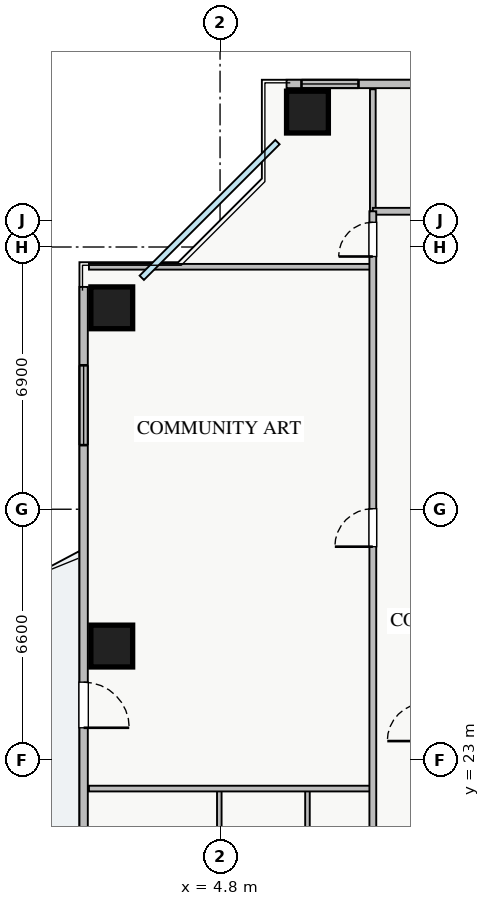
"""IFC4 building model, lengths in metres.
Left out: names, types, materials, properties, quantities, classifications, styles, units other than length and angle.
Written with IfcOpenShell. Run it as: python <this file> out.ifc"""

import sys

from ifc_helpers import new_model, si_unit, direction, frame, frame_2d, origin, origin_2d, place, context, subcontext, project, spatial, rectangle, extrude, source, transform, mapped, element, fill, save


model = new_model("IFC4")
c1 = context("Model", 3, precision=1e-05, world=origin(), true_north=direction((0.0, 1.0)))
c2 = subcontext(c1, "Body", "Model", "MODEL_VIEW")
j1 = project(units=[si_unit("LENGTHUNIT", "METRE"), si_unit("PLANEANGLEUNIT", "RADIAN")], contexts=[c1])
p1 = place(None, origin())
s1 = spatial("IfcSite", under=j1, at=p1, CompositionType="ELEMENT")
p2 = place(p1, origin())
s2 = spatial("IfcBuilding", under=s1, at=p2, CompositionType="ELEMENT")
p3 = place(p2, frame((0.0, 0.0, 103.5)))
s3 = spatial("IfcBuildingStorey", under=s2, at=p3, CompositionType="ELEMENT", Elevation=103.5)
m1 = source(origin(), c2, "Body", "SweptSolid", [
    extrude(rectangle(XDim=1.1, YDim=1.1, at=origin_2d()), origin(), (0.0, 0.0, 1.0), 3.25),
])
for number, where, z_axis, x_axis in (
    (1, (7.1, 40.05, 0.0), (0.0, 0.0, 1.0), (1.0, 0.0, 0.0)),
    (2, (1.95, 34.9, 0.0), (0.0, 0.0, 1.0), (1.0, 0.0, 0.0)),
    (3, (1.95, 26.0, 0.0), (0.0, 0.0, 1.0), (1.0, 0.0, 0.0)),
):
    element("IfcColumn", number, at=place(p3, frame(where, z_axis=z_axis, x_axis=x_axis)), inside=s3, PredefinedType="COLUMN", context=c2, shape_type="MappedRepresentation", body=[
        mapped(m1, transform((0.0, 0.0, 0.0), x_axis=(1.0, 0.0, 0.0), y_axis=(0.0, 1.0, 0.0), z_axis=(0.0, 0.0, 1.0), scale=1.0)),
    ])
p4 = place(p3, frame((6.55, 40.79, 0.0), z_axis=(0.0, 0.0, 1.0), x_axis=(1.0, 0.0, 0.0)))
e4 = element("IfcWall", 4, at=p4, inside=s3, PredefinedType="STANDARD", context=c2, shape_type="SweptSolid", body=[
    extrude(rectangle(XDim=24.9, YDim=0.22, at=frame_2d((12.45, 0.0))), origin(), (0.0, 0.0, 1.0), 2.61),
])
p5 = place(p4, frame((13.3, 0.0, 0.0)))
e5 = element("IfcOpeningElement", 5, at=p5, cuts=e4, PredefinedType="OPENING", context=c2, shape_type="SweptSolid", body=[
    extrude(rectangle(XDim=1.2, YDim=2.1, at=frame_2d((0.6, 1.05))), frame((0.0, 0.12, 0.0), z_axis=(0.0, -1.0, 0.0), x_axis=(1.0, 0.0, 0.0)), (0.0, 0.0, 1.0), 0.24),
])
p6 = place(p4, frame((0.393, 0.0, 0.9)))
e6 = element("IfcOpeningElement", 6, at=p6, cuts=e4, PredefinedType="OPENING", context=c2, shape_type="SweptSolid", body=[
    extrude(rectangle(XDim=1.5, YDim=1.5, at=frame_2d((0.75, 0.75))), frame((0.0, 0.12, 0.0), z_axis=(0.0, -1.0, 0.0), x_axis=(1.0, 0.0, 0.0)), (0.0, 0.0, 1.0), 0.24),
])
p7 = place(p4, frame((9.76, 0.0, 0.9)))
e7 = element("IfcOpeningElement", 7, at=p7, cuts=e4, PredefinedType="OPENING", context=c2, shape_type="SweptSolid", body=[
    extrude(rectangle(XDim=1.8, YDim=1.5, at=frame_2d((0.9, 0.75))), frame((0.0, 0.12, 0.0), z_axis=(0.0, -1.0, 0.0), x_axis=(1.0, 0.0, 0.0)), (0.0, 0.0, 1.0), 0.24),
])
p8 = place(p4, frame((14.813, 0.0, 0.9)))
e8 = element("IfcOpeningElement", 8, at=p8, cuts=e4, PredefinedType="OPENING", context=c2, shape_type="SweptSolid", body=[
    extrude(rectangle(XDim=1.5, YDim=1.45, at=frame_2d((0.75, 0.725))), frame((0.0, 0.12, 0.0), z_axis=(0.0, -1.0, 0.0), x_axis=(1.0, 0.0, 0.0)), (0.0, 0.0, 1.0), 0.24),
])
p9 = place(p4, frame((20.738, 0.0, 0.9)))
e9 = element("IfcOpeningElement", 9, at=p9, cuts=e4, PredefinedType="OPENING", context=c2, shape_type="SweptSolid", body=[
    extrude(rectangle(XDim=2.1, YDim=1.48, at=frame_2d((1.05, 0.74))), frame((0.0, 0.12, 0.0), z_axis=(0.0, -1.0, 0.0), x_axis=(1.0, 0.0, 0.0)), (0.0, 0.0, 1.0), 0.24),
])
p10 = place(p4, frame((4.171, 0.0, 0.9)))
e10 = element("IfcOpeningElement", 10, at=p10, cuts=e4, PredefinedType="OPENING", context=c2, shape_type="SweptSolid", body=[
    extrude(rectangle(XDim=2.4, YDim=1.5, at=frame_2d((1.2, 0.75))), frame((0.0, 0.12, 0.0), z_axis=(0.0, -1.0, 0.0), x_axis=(1.0, 0.0, 0.0)), (0.0, 0.0, 1.0), 0.24),
])
p11 = place(p3, frame((1.21, 10.55, 0.0), z_axis=(0.0, 0.0, 1.0), x_axis=(0.0, 1.0, 0.0)))
e11 = element("IfcWall", 11, at=p11, inside=s3, PredefinedType="STANDARD", context=c2, shape_type="SweptSolid", body=[
    extrude(rectangle(XDim=24.9, YDim=0.22, at=frame_2d((12.45, 0.0))), origin(), (0.0, 0.0, 1.0), 2.61),
])
p12 = place(p11, frame((13.3, 0.0, 0.0)))
e12 = element("IfcOpeningElement", 12, at=p12, cuts=e11, PredefinedType="OPENING", context=c2, shape_type="SweptSolid", body=[
    extrude(rectangle(XDim=1.2, YDim=2.1, at=frame_2d((0.6, 1.05))), frame((0.0, 0.12, 0.0), z_axis=(0.0, -1.0, 0.0), x_axis=(1.0, 0.0, 0.0)), (0.0, 0.0, 1.0), 0.24),
])
p13 = place(p11, frame((1.912, 0.0, 0.9)))
e13 = element("IfcOpeningElement", 13, at=p13, cuts=e11, PredefinedType="OPENING", context=c2, shape_type="SweptSolid", body=[
    extrude(rectangle(XDim=2.4, YDim=1.48, at=frame_2d((1.2, 0.74))), frame((0.0, 0.12, 0.0), z_axis=(0.0, -1.0, 0.0), x_axis=(1.0, 0.0, 0.0)), (0.0, 0.0, 1.0), 0.24),
])
p14 = place(p11, frame((20.737, 0.0, 0.9)))
e14 = element("IfcOpeningElement", 14, at=p14, cuts=e11, PredefinedType="OPENING", context=c2, shape_type="SweptSolid", body=[
    extrude(rectangle(XDim=2.1, YDim=1.48, at=frame_2d((1.05, 0.74))), frame((0.0, 0.12, 0.0), z_axis=(0.0, -1.0, 0.0), x_axis=(1.0, 0.0, 0.0)), (0.0, 0.0, 1.0), 0.24),
])
p15 = place(p11, frame((5.38, 0.0, 0.9)))
e15 = element("IfcOpeningElement", 15, at=p15, cuts=e11, PredefinedType="OPENING", context=c2, shape_type="SweptSolid", body=[
    extrude(rectangle(XDim=0.9, YDim=1.2, at=frame_2d((0.45, 0.6))), frame((0.0, 0.12, 0.0), z_axis=(0.0, -1.0, 0.0), x_axis=(1.0, 0.0, 0.0)), (0.0, 0.0, 1.0), 0.24),
])
p16 = place(p3, frame((8.82, 37.44, 0.0), z_axis=(0.0, 0.0, 1.0), x_axis=(0.0, 1.0, 0.0)))
e16 = element("IfcWall", 16, at=p16, inside=s3, PredefinedType="PARTITIONING", context=c2, shape_type="SweptSolid", body=[
    extrude(rectangle(XDim=3.21, YDim=0.15, at=frame_2d((1.605, 0.0))), origin(), (0.0, 0.0, 1.0), 3.07),
])
p17 = place(p3, frame((8.82, 37.44, 0.0), z_axis=(0.0, 0.0, 1.0), x_axis=(1.0, 0.0, 0.0)))
e17 = element("IfcWall", 17, at=p17, inside=s3, PredefinedType="PARTITIONING", context=c2, shape_type="SweptSolid", body=[
    extrude(rectangle(XDim=23.58, YDim=0.18, at=frame_2d((11.79, 0.0))), origin(), (0.0, 0.0, 1.0), 3.07),
])
p18 = place(p17, frame((2.75, 0.0, 0.0)))
e18 = element("IfcOpeningElement", 18, at=p18, cuts=e17, PredefinedType="OPENING", context=c2, shape_type="SweptSolid", body=[
    extrude(rectangle(XDim=1.0, YDim=2.05, at=frame_2d((0.5, 1.025))), frame((0.0, 0.1, 0.0), z_axis=(0.0, -1.0, 0.0), x_axis=(1.0, 0.0, 0.0)), (0.0, 0.0, 1.0), 0.2),
])
p19 = place(p17, frame((7.89, 0.0, 0.0)))
e19 = element("IfcOpeningElement", 19, at=p19, cuts=e17, PredefinedType="OPENING", context=c2, shape_type="SweptSolid", body=[
    extrude(rectangle(XDim=1.0, YDim=2.05, at=frame_2d((0.5, 1.025))), frame((0.0, 0.1, 0.0), z_axis=(0.0, -1.0, 0.0), x_axis=(1.0, 0.0, 0.0)), (0.0, 0.0, 1.0), 0.2),
])
p20 = place(p17, frame((13.325, 0.0, 0.0)))
e20 = element("IfcOpeningElement", 20, at=p20, cuts=e17, PredefinedType="OPENING", context=c2, shape_type="SweptSolid", body=[
    extrude(rectangle(XDim=1.0, YDim=2.05, at=frame_2d((0.5, 1.025))), frame((0.0, 0.1, 0.0), z_axis=(0.0, -1.0, 0.0), x_axis=(1.0, 0.0, 0.0)), (0.0, 0.0, 1.0), 0.2),
])
p21 = place(p17, frame((19.765, 0.0, 0.0)))
e21 = element("IfcOpeningElement", 21, at=p21, cuts=e17, PredefinedType="OPENING", context=c2, shape_type="SweptSolid", body=[
    extrude(rectangle(XDim=1.0, YDim=2.05, at=frame_2d((0.5, 1.025))), frame((0.0, 0.1, 0.0), z_axis=(0.0, -1.0, 0.0), x_axis=(1.0, 0.0, 0.0)), (0.0, 0.0, 1.0), 0.2),
])
p22 = place(p3, frame((1.35, 35.98, 0.0), z_axis=(0.0, 0.0, 1.0), x_axis=(1.0, 0.0, 0.0)))
e22 = element("IfcWall", 22, at=p22, inside=s3, PredefinedType="PARTITIONING", context=c2, shape_type="SweptSolid", body=[
    extrude(rectangle(XDim=7.47, YDim=0.15, at=frame_2d((3.735, 0.0))), origin(), (0.0, 0.0, 1.0), 3.07),
])
for number, where, z_axis, x_axis in (
    (23, (4.78, 15.71, 0.0), (0.0, 0.0, 1.0), (0.0, 1.0, 0.0)),
    (24, (7.1, 15.71, 0.0), (0.0, 0.0, 1.0), (0.0, 1.0, 0.0)),
):
    element("IfcWall", number, at=place(p3, frame(where, z_axis=z_axis, x_axis=x_axis)), inside=s3, PredefinedType="PLUMBINGWALL", context=c2, shape_type="SweptSolid", body=[
        extrude(rectangle(XDim=6.54, YDim=0.12, at=frame_2d((3.27, 0.0))), origin(), (0.0, 0.0, 1.0), 3.07),
    ])
p23 = place(p3, frame((1.35, 22.25, 0.0), z_axis=(0.0, 0.0, 1.0), x_axis=(1.0, 0.0, 0.0)))
e25 = element("IfcWall", 25, at=p23, inside=s3, PredefinedType="PARTITIONING", context=c2, shape_type="SweptSolid", body=[
    extrude(rectangle(XDim=7.47, YDim=0.15, at=frame_2d((3.735, 0.0))), origin(), (0.0, 0.0, 1.0), 3.07),
])
p24 = place(p3, frame((8.82, 8.31, 0.0), z_axis=(0.0, 0.0, 1.0), x_axis=(0.0, 1.0, 0.0)))
e26 = element("IfcWall", 26, at=p24, inside=s3, PredefinedType="PARTITIONING", context=c2, shape_type="SweptSolid", body=[
    extrude(rectangle(XDim=29.13, YDim=0.18, at=frame_2d((14.565, 0.0))), origin(), (0.0, 0.0, 1.0), 3.07),
])
p25 = place(p24, frame((27.94, 0.0, 0.0)))
e27 = element("IfcOpeningElement", 27, at=p25, cuts=e26, PredefinedType="OPENING", context=c2, shape_type="SweptSolid", body=[
    extrude(rectangle(XDim=0.9, YDim=2.05, at=frame_2d((0.45, 1.025))), frame((0.0, 0.1, 0.0), z_axis=(0.0, -1.0, 0.0), x_axis=(1.0, 0.0, 0.0)), (0.0, 0.0, 1.0), 0.2),
])
p26 = place(p24, frame((0.24, 0.0, 0.0)))
e28 = element("IfcOpeningElement", 28, at=p26, cuts=e26, PredefinedType="OPENING", context=c2, shape_type="SweptSolid", body=[
    extrude(rectangle(XDim=0.9, YDim=2.05, at=frame_2d((0.45, 1.025))), frame((0.0, 0.1, 0.0), z_axis=(0.0, -1.0, 0.0), x_axis=(1.0, 0.0, 0.0)), (0.0, 0.0, 1.0), 0.2),
])
p27 = place(p24, frame((3.69, 0.0, 0.0)))
e29 = element("IfcOpeningElement", 29, at=p27, cuts=e26, PredefinedType="OPENING", context=c2, shape_type="SweptSolid", body=[
    extrude(rectangle(XDim=1.0, YDim=2.05, at=frame_2d((0.5, 1.025))), frame((0.0, 0.1, 0.0), z_axis=(0.0, -1.0, 0.0), x_axis=(1.0, 0.0, 0.0)), (0.0, 0.0, 1.0), 0.2),
])
p28 = place(p24, frame((20.305, 0.0, 0.0)))
e30 = element("IfcOpeningElement", 30, at=p28, cuts=e26, PredefinedType="OPENING", context=c2, shape_type="SweptSolid", body=[
    extrude(rectangle(XDim=1.0, YDim=2.05, at=frame_2d((0.5, 1.025))), frame((0.0, 0.1, 0.0), z_axis=(0.0, -1.0, 0.0), x_axis=(1.0, 0.0, 0.0)), (0.0, 0.0, 1.0), 0.2),
])
m2 = source(origin(), c2, "Body", "SweptSolid", [
    extrude(rectangle(XDim=1.5, YDim=1.5, at=frame_2d((0.75, 0.75))), frame((0.0, 0.03, 0.0), z_axis=(0.0, -1.0, 0.0), x_axis=(1.0, 0.0, 0.0)), (0.0, 0.0, 1.0), 0.06),
])
p29 = place(p6, origin())
e31 = element("IfcWindow", 31, at=p29, inside=s3, PartitioningType="TRIPLE_PANEL_VERTICAL", PredefinedType="WINDOW", context=c2, shape_type="MappedRepresentation", body=[
    mapped(m2, transform((0.0, 0.0, 0.0), x_axis=(1.0, 0.0, 0.0), y_axis=(0.0, 1.0, 0.0), z_axis=(0.0, 0.0, 1.0), scale=1.0)),
])
fill(e6, e31)
m3 = source(origin(), c2, "Body", "SweptSolid", [
    extrude(rectangle(XDim=1.2, YDim=2.1, at=frame_2d((0.6, 1.05))), frame((0.0, 0.025, 0.0), z_axis=(0.0, -1.0, 0.0), x_axis=(1.0, 0.0, 0.0)), (0.0, 0.0, 1.0), 0.05),
])
p30 = place(p12, frame((1.2, 0.0, 0.0), z_axis=(0.0, 0.0, 1.0), x_axis=(-1.0, 0.0, 0.0)))
e32 = element("IfcDoor", 32, at=p30, inside=s3, OperationType="SINGLE_SWING_LEFT", PredefinedType="DOOR", context=c2, shape_type="MappedRepresentation", body=[
    mapped(m3, transform((0.0, 0.0, 0.0), x_axis=(1.0, 0.0, 0.0), y_axis=(0.0, 1.0, 0.0), z_axis=(0.0, 0.0, 1.0), scale=1.0)),
])
fill(e12, e32)
m4 = source(origin(), c2, "Body", "SweptSolid", [
    extrude(rectangle(XDim=2.1, YDim=1.48, at=frame_2d((1.05, 0.74))), frame((0.0, 0.03, 0.0), z_axis=(0.0, -1.0, 0.0), x_axis=(1.0, 0.0, 0.0)), (0.0, 0.0, 1.0), 0.06),
])
p31 = place(p14, origin())
e33 = element("IfcWindow", 33, at=p31, inside=s3, PartitioningType="TRIPLE_PANEL_VERTICAL", PredefinedType="WINDOW", context=c2, shape_type="MappedRepresentation", body=[
    mapped(m4, transform((0.0, 0.0, 0.0), x_axis=(1.0, 0.0, 0.0), y_axis=(0.0, 1.0, 0.0), z_axis=(0.0, 0.0, 1.0), scale=1.0)),
])
fill(e14, e33)
m5 = source(origin(), c2, "Body", "SweptSolid", [
    extrude(rectangle(XDim=0.9, YDim=2.05, at=frame_2d((0.45, 1.025))), frame((0.0, 0.025, 0.0), z_axis=(0.0, -1.0, 0.0), x_axis=(1.0, 0.0, 0.0)), (0.0, 0.0, 1.0), 0.05),
])
p32 = place(p25, origin())
e34 = element("IfcDoor", 34, at=p32, inside=s3, OperationType="SINGLE_SWING_LEFT", PredefinedType="DOOR", context=c2, shape_type="MappedRepresentation", body=[
    mapped(m5, transform((0.0, 0.0, 0.0), x_axis=(1.0, 0.0, 0.0), y_axis=(0.0, 1.0, 0.0), z_axis=(0.0, 0.0, 1.0), scale=1.0)),
])
fill(e27, e34)
m6 = source(origin(), c2, "Body", "SweptSolid", [
    extrude(rectangle(XDim=1.0, YDim=2.05, at=frame_2d((0.5, 1.025))), frame((0.0, 0.025, 0.0), z_axis=(0.0, -1.0, 0.0), x_axis=(1.0, 0.0, 0.0)), (0.0, 0.0, 1.0), 0.05),
])
p33 = place(p28, origin())
e35 = element("IfcDoor", 35, at=p33, inside=s3, OperationType="SINGLE_SWING_LEFT", PredefinedType="DOOR", context=c2, shape_type="MappedRepresentation", body=[
    mapped(m6, transform((0.0, 0.0, 0.0), x_axis=(1.0, 0.0, 0.0), y_axis=(0.0, 1.0, 0.0), z_axis=(0.0, 0.0, 1.0), scale=1.0)),
])
fill(e30, e35)
save(model, sys.argv[1])
